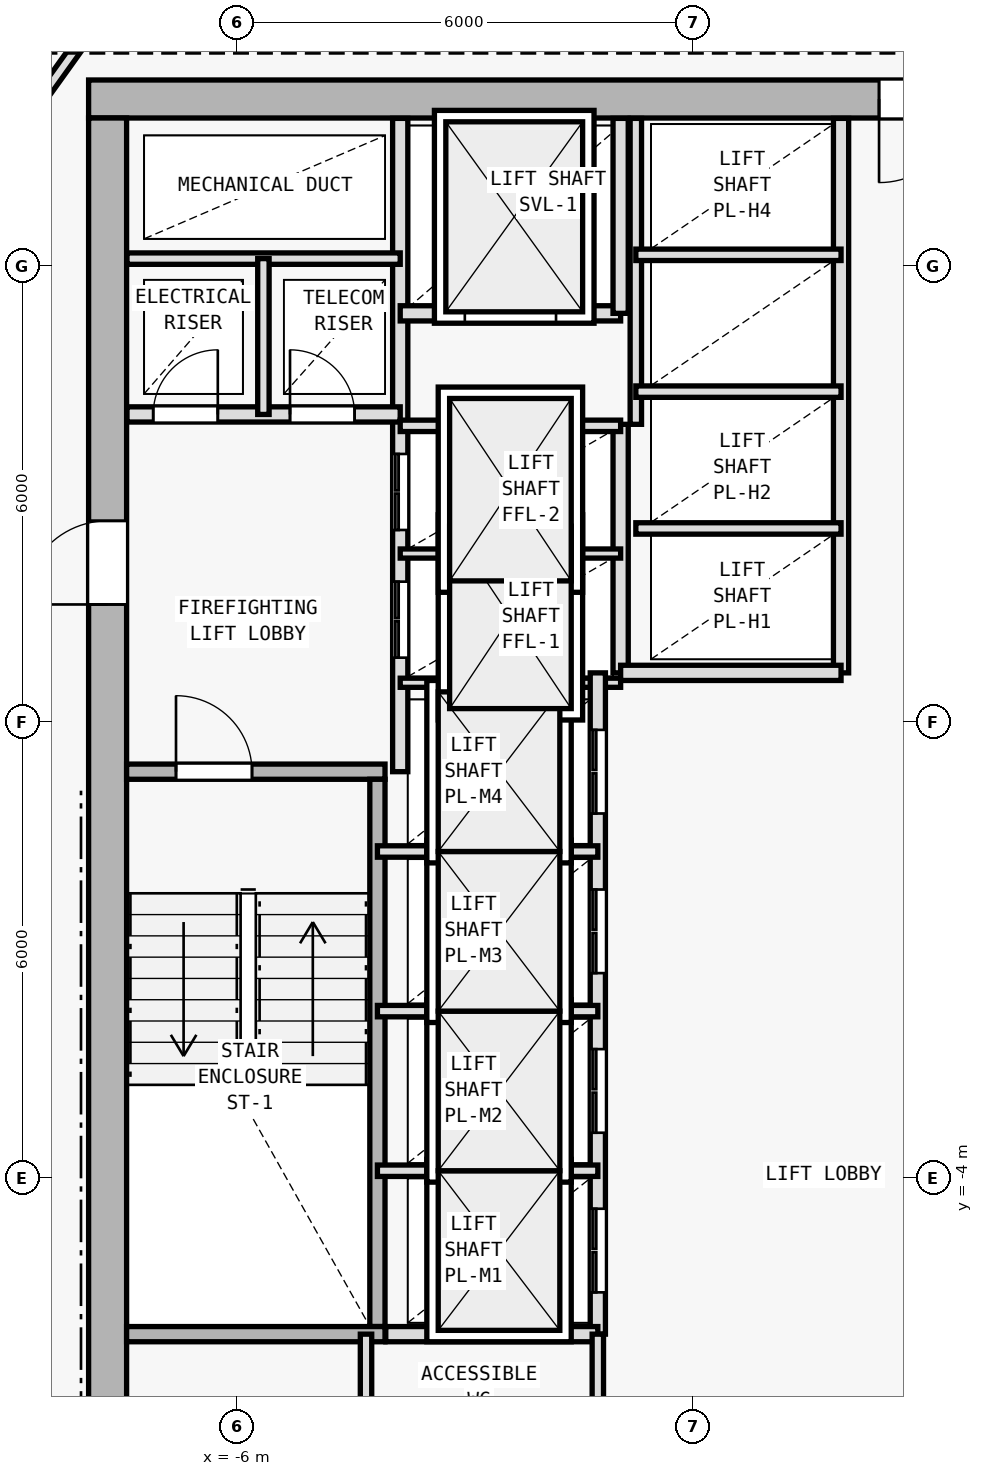
"""IFC4 building model, lengths in metres.
Left out: names, types, materials, properties, quantities, classifications, styles, units other than length and angle.
Written with IfcOpenShell. Run it as: python <this file> out.ifc"""

import sys

from ifc_helpers import new_model, si_unit, direction, frame, frame_2d, origin, origin_2d, place, context, subcontext, project, spatial, rectangle, i_section, extrude, element, fill, save


model = new_model("IFC4")
c1 = context("Model", 3, precision=1e-05, world=origin(), true_north=direction((0.0, 1.0)))
c2 = subcontext(c1, "Body", "Model", "MODEL_VIEW")
j1 = project(units=[si_unit("LENGTHUNIT", "METRE"), si_unit("PLANEANGLEUNIT", "RADIAN")], contexts=[c1])
p1 = place(None, origin())
s1 = spatial("IfcSite", under=j1, at=p1, CompositionType="ELEMENT")
p2 = place(p1, origin())
s2 = spatial("IfcBuilding", under=s1, at=p2, CompositionType="ELEMENT")
p3 = place(p2, frame((0.0, 0.0, 149.4)))
s3 = spatial("IfcBuildingStorey", under=s2, at=p3, CompositionType="ELEMENT", Elevation=149.4)
for number, where, z_axis, x_axis in (
    (1, (-7.7, 10.2, 0.0), (0.0, 0.0, 1.0), (1.0, 0.0, 0.0)),
    (2, (-7.7, 2.0, 0.0), (0.0, 0.0, 1.0), (1.0, 0.0, 0.0)),
):
    element("IfcColumn", number, at=place(p3, frame(where, z_axis=z_axis, x_axis=x_axis)), inside=s3, PredefinedType="COLUMN", context=c2, shape_type="SweptSolid", body=[
        extrude(i_section(OverallWidth=0.404, OverallDepth=0.407, WebThickness=0.017, FlangeThickness=0.028, FilletRadius=0.015, at=origin_2d()), origin(), (0.0, 0.0, 1.0), 3.6),
    ])
p4 = place(p3, frame((7.95, 10.2, 0.0), z_axis=(0.0, 0.0, 1.0), x_axis=(-1.0, 0.0, 0.0)))
e3 = element("IfcWall", 3, at=p4, inside=s3, PredefinedType="SHEAR", context=c2, shape_type="SweptSolid", body=[
    extrude(rectangle(XDim=15.9, YDim=0.5, at=frame_2d((7.95, 0.0))), origin(), (0.0, 0.0, 1.0), 3.35),
])
p5 = place(p4, frame((4.4, 0.0, 0.0)))
e4 = element("IfcOpeningElement", 4, at=p5, cuts=e3, PredefinedType="OPENING", context=c2, shape_type="SweptSolid", body=[
    extrude(rectangle(XDim=1.1, YDim=2.15, at=frame_2d((0.55, 1.075))), frame((0.0, 0.26, 0.0), z_axis=(0.0, -1.0, 0.0), x_axis=(1.0, 0.0, 0.0)), (0.0, 0.0, 1.0), 0.52),
])
p6 = place(p3, frame((-7.7, -9.15, 0.0), z_axis=(0.0, 0.0, 1.0), x_axis=(0.0, 1.0, 0.0)))
e5 = element("IfcWall", 5, at=p6, inside=s3, PredefinedType="SHEAR", context=c2, shape_type="SweptSolid", body=[
    extrude(rectangle(XDim=19.1, YDim=0.5, at=frame_2d((9.55, 0.0))), origin(), (0.0, 0.0, 1.0), 3.35),
])
p7 = place(p6, frame((12.7, 0.0, 0.0)))
e6 = element("IfcOpeningElement", 6, at=p7, cuts=e5, PredefinedType="OPENING", context=c2, shape_type="SweptSolid", body=[
    extrude(rectangle(XDim=1.1, YDim=2.15, at=frame_2d((0.55, 1.075))), frame((0.0, 0.26, 0.0), z_axis=(0.0, -1.0, 0.0), x_axis=(1.0, 0.0, 0.0)), (0.0, 0.0, 1.0), 0.52),
])
p8 = place(p3, frame((-7.45, 1.35, 0.0), z_axis=(0.0, 0.0, 1.0), x_axis=(1.0, 0.0, 0.0)))
e7 = element("IfcWall", 7, at=p8, inside=s3, PredefinedType="SOLIDWALL", context=c2, shape_type="SweptSolid", body=[
    extrude(rectangle(XDim=3.4, YDim=0.2, at=frame_2d((1.7, 0.0))), origin(), (0.0, 0.0, 1.0), 3.35),
])
p9 = place(p8, frame((0.65, 0.0, 0.0)))
e8 = element("IfcOpeningElement", 8, at=p9, cuts=e7, PredefinedType="OPENING", context=c2, shape_type="SweptSolid", body=[
    extrude(rectangle(XDim=1.0, YDim=2.15, at=frame_2d((0.5, 1.075))), frame((0.0, 0.11, 0.0), z_axis=(0.0, -1.0, 0.0), x_axis=(1.0, 0.0, 0.0)), (0.0, 0.0, 1.0), 0.22),
])
p10 = place(p3, frame((-4.15, -5.95, 0.0), z_axis=(0.0, 0.0, 1.0), x_axis=(0.0, 1.0, 0.0)))
e9 = element("IfcWall", 9, at=p10, inside=s3, PredefinedType="SOLIDWALL", context=c2, shape_type="SweptSolid", body=[
    extrude(rectangle(XDim=7.2, YDim=0.2, at=frame_2d((3.6, 0.0))), origin(), (0.0, 0.0, 1.0), 3.35),
])
p11 = place(p3, frame((-3.85, 1.35, 0.0), z_axis=(0.0, 0.0, 1.0), x_axis=(0.0, 1.0, 0.0)))
e10 = element("IfcWall", 10, at=p11, inside=s3, PredefinedType="SOLIDWALL", context=c2, shape_type="SweptSolid", body=[
    extrude(rectangle(XDim=8.595, YDim=0.2, at=frame_2d((4.297, 0.0))), origin(), (0.0, 0.0, 1.0), 3.35),
])
p12 = place(p11, frame((1.5, 0.0, 0.0)))
e11 = element("IfcOpeningElement", 11, at=p12, cuts=e10, PredefinedType="OPENING", context=c2, shape_type="SweptSolid", body=[
    extrude(rectangle(XDim=1.0, YDim=2.15, at=frame_2d((0.5, 1.075))), frame((0.0, 0.11, 0.0), z_axis=(0.0, -1.0, 0.0), x_axis=(1.0, 0.0, 0.0)), (0.0, 0.0, 1.0), 0.22),
])
p13 = place(p11, frame((3.18, 0.0, 0.0)))
e12 = element("IfcOpeningElement", 12, at=p13, cuts=e10, PredefinedType="OPENING", context=c2, shape_type="SweptSolid", body=[
    extrude(rectangle(XDim=1.0, YDim=2.15, at=frame_2d((0.5, 1.075))), frame((0.0, 0.11, 0.0), z_axis=(0.0, -1.0, 0.0), x_axis=(1.0, 0.0, 0.0)), (0.0, 0.0, 1.0), 0.22),
])
p14 = place(p3, frame((-7.445, 6.05, 0.0), z_axis=(0.0, 0.0, 1.0), x_axis=(1.0, 0.0, 0.0)))
e13 = element("IfcWall", 13, at=p14, inside=s3, PredefinedType="SOLIDWALL", context=c2, shape_type="SweptSolid", body=[
    extrude(rectangle(XDim=3.595, YDim=0.2, at=frame_2d((1.797, 0.0))), origin(), (0.0, 0.0, 1.0), 3.35),
])
p15 = place(p14, frame((0.345, 0.0, 0.0)))
e14 = element("IfcOpeningElement", 14, at=p15, cuts=e13, PredefinedType="OPENING", context=c2, shape_type="SweptSolid", body=[
    extrude(rectangle(XDim=0.85, YDim=2.1, at=frame_2d((0.425, 1.05))), frame((0.0, 0.11, 0.0), z_axis=(0.0, -1.0, 0.0), x_axis=(1.0, 0.0, 0.0)), (0.0, 0.0, 1.0), 0.22),
])
p16 = place(p14, frame((2.145, 0.0, 0.0)))
e15 = element("IfcOpeningElement", 15, at=p16, cuts=e13, PredefinedType="OPENING", context=c2, shape_type="SweptSolid", body=[
    extrude(rectangle(XDim=0.85, YDim=2.1, at=frame_2d((0.425, 1.05))), frame((0.0, 0.11, 0.0), z_axis=(0.0, -1.0, 0.0), x_axis=(1.0, 0.0, 0.0)), (0.0, 0.0, 1.0), 0.22),
])
p17 = place(p3, frame((-7.445, 8.1, 0.0), z_axis=(0.0, 0.0, 1.0), x_axis=(1.0, 0.0, 0.0)))
e16 = element("IfcWall", 16, at=p17, inside=s3, PredefinedType="PARTITIONING", context=c2, shape_type="SweptSolid", body=[
    extrude(rectangle(XDim=3.595, YDim=0.15, at=frame_2d((1.797, 0.0))), origin(), (0.0, 0.0, 1.0), 3.35),
])
p18 = place(p3, frame((-5.65, 6.05, 0.0), z_axis=(0.0, 0.0, 1.0), x_axis=(0.0, 1.0, 0.0)))
e17 = element("IfcWall", 17, at=p18, inside=s3, PredefinedType="PARTITIONING", context=c2, shape_type="SweptSolid", body=[
    extrude(rectangle(XDim=2.05, YDim=0.15, at=frame_2d((1.025, 0.0))), origin(), (0.0, 0.0, 1.0), 3.35),
])
p19 = place(p3, frame((-0.95, 2.65, 0.0), z_axis=(0.0, 0.0, 1.0), x_axis=(0.0, 1.0, 0.0)))
e18 = element("IfcWall", 18, at=p19, inside=s3, PredefinedType="SOLIDWALL", context=c2, shape_type="SweptSolid", body=[
    extrude(rectangle(XDim=3.27, YDim=0.2, at=frame_2d((1.635, 0.0))), origin(), (0.0, 0.0, 1.0), 3.35),
])
for number, where, z_axis, x_axis in (
    (19, (-3.85, 2.52, 0.0), (0.0, 0.0, 1.0), (1.0, 0.0, 0.0)),
    (20, (-3.85, 4.22, 0.0), (0.0, 0.0, 1.0), (1.0, 0.0, 0.0)),
):
    element("IfcWall", number, at=place(p3, frame(where, z_axis=z_axis, x_axis=x_axis)), inside=s3, PredefinedType="PARTITIONING", context=c2, shape_type="SweptSolid", body=[
        extrude(rectangle(XDim=2.9, YDim=0.12, at=frame_2d((1.45, 0.0))), origin(), (0.0, 0.0, 1.0), 3.35),
    ])
p20 = place(p3, frame((-3.85, 5.9, 0.0), z_axis=(0.0, 0.0, 1.0), x_axis=(1.0, 0.0, 0.0)))
e21 = element("IfcWall", 21, at=p20, inside=s3, PredefinedType="PARTITIONING", context=c2, shape_type="SweptSolid", body=[
    extrude(rectangle(XDim=2.9, YDim=0.15, at=frame_2d((1.45, 0.0))), origin(), (0.0, 0.0, 1.0), 3.35),
])
p21 = place(p3, frame((-3.85, 7.38, 0.0), z_axis=(0.0, 0.0, 1.0), x_axis=(1.0, 0.0, 0.0)))
e22 = element("IfcWall", 22, at=p21, inside=s3, PredefinedType="SOLIDWALL", context=c2, shape_type="SweptSolid", body=[
    extrude(rectangle(XDim=2.9, YDim=0.2, at=frame_2d((1.45, 0.0))), origin(), (0.0, 0.0, 1.0), 3.35),
])
p22 = place(p21, frame((0.85, 0.0, 0.0)))
e23 = element("IfcOpeningElement", 23, at=p22, cuts=e22, PredefinedType="OPENING", context=c2, shape_type="SweptSolid", body=[
    extrude(rectangle(XDim=1.2, YDim=2.2, at=frame_2d((0.6, 1.1))), frame((0.0, 0.11, 0.0), z_axis=(0.0, -1.0, 0.0), x_axis=(1.0, 0.0, 0.0)), (0.0, 0.0, 1.0), 0.22),
])
p23 = place(p3, frame((-0.95, 7.38, 0.0), z_axis=(0.0, 0.0, 1.0), x_axis=(0.0, 1.0, 0.0)))
e24 = element("IfcWall", 24, at=p23, inside=s3, PredefinedType="SOLIDWALL", context=c2, shape_type="SweptSolid", body=[
    extrude(rectangle(XDim=2.565, YDim=0.2, at=frame_2d((1.283, 0.0))), origin(), (0.0, 0.0, 1.0), 3.35),
])
p24 = place(p3, frame((-1.25, -6.05, 0.0), z_axis=(0.0, 0.0, 1.0), x_axis=(0.0, 1.0, 0.0)))
e25 = element("IfcWall", 25, at=p24, inside=s3, PredefinedType="SOLIDWALL", context=c2, shape_type="SweptSolid", body=[
    extrude(rectangle(XDim=8.7, YDim=0.2, at=frame_2d((4.35, 0.0))), origin(), (0.0, 0.0, 1.0), 3.35),
])
p25 = place(p24, frame((0.55, 0.0, 0.0)))
e26 = element("IfcOpeningElement", 26, at=p25, cuts=e25, PredefinedType="OPENING", context=c2, shape_type="SweptSolid", body=[
    extrude(rectangle(XDim=1.1, YDim=2.15, at=frame_2d((0.55, 1.075))), frame((0.0, 0.11, 0.0), z_axis=(0.0, -1.0, 0.0), x_axis=(1.0, 0.0, 0.0)), (0.0, 0.0, 1.0), 0.22),
])
p26 = place(p24, frame((2.65, 0.0, 0.0)))
e27 = element("IfcOpeningElement", 27, at=p26, cuts=e25, PredefinedType="OPENING", context=c2, shape_type="SweptSolid", body=[
    extrude(rectangle(XDim=1.1, YDim=2.15, at=frame_2d((0.55, 1.075))), frame((0.0, 0.11, 0.0), z_axis=(0.0, -1.0, 0.0), x_axis=(1.0, 0.0, 0.0)), (0.0, 0.0, 1.0), 0.22),
])
p27 = place(p24, frame((4.75, 0.0, 0.0)))
e28 = element("IfcOpeningElement", 28, at=p27, cuts=e25, PredefinedType="OPENING", context=c2, shape_type="SweptSolid", body=[
    extrude(rectangle(XDim=1.1, YDim=2.15, at=frame_2d((0.55, 1.075))), frame((0.0, 0.11, 0.0), z_axis=(0.0, -1.0, 0.0), x_axis=(1.0, 0.0, 0.0)), (0.0, 0.0, 1.0), 0.22),
])
p28 = place(p24, frame((6.85, 0.0, 0.0)))
e29 = element("IfcOpeningElement", 29, at=p28, cuts=e25, PredefinedType="OPENING", context=c2, shape_type="SweptSolid", body=[
    extrude(rectangle(XDim=1.1, YDim=2.15, at=frame_2d((0.55, 1.075))), frame((0.0, 0.11, 0.0), z_axis=(0.0, -1.0, 0.0), x_axis=(1.0, 0.0, 0.0)), (0.0, 0.0, 1.0), 0.22),
])
for number, where, z_axis, x_axis in (
    (30, (-4.15, -3.9, 0.0), (0.0, 0.0, 1.0), (1.0, 0.0, 0.0)),
    (31, (-4.15, -1.8, 0.0), (0.0, 0.0, 1.0), (1.0, 0.0, 0.0)),
    (32, (-4.15, 0.3, 0.0), (0.0, 0.0, 1.0), (1.0, 0.0, 0.0)),
):
    element("IfcWall", number, at=place(p3, frame(where, z_axis=z_axis, x_axis=x_axis)), inside=s3, PredefinedType="PARTITIONING", context=c2, shape_type="SweptSolid", body=[
        extrude(rectangle(XDim=2.9, YDim=0.15, at=frame_2d((1.45, 0.0))), origin(), (0.0, 0.0, 1.0), 3.35),
    ])
p29 = place(p3, frame((1.95, 2.65, 0.0), z_axis=(0.0, 0.0, 1.0), x_axis=(0.0, 1.0, 0.0)))
e33 = element("IfcWall", 33, at=p29, inside=s3, PredefinedType="SOLIDWALL", context=c2, shape_type="SweptSolid", body=[
    extrude(rectangle(XDim=7.295, YDim=0.2, at=frame_2d((3.647, 0.0))), origin(), (0.0, 0.0, 1.0), 3.35),
])
p30 = place(p3, frame((-0.95, 2.65, 0.0), z_axis=(0.0, 0.0, 1.0), x_axis=(1.0, 0.0, 0.0)))
e34 = element("IfcWall", 34, at=p30, inside=s3, PredefinedType="SOLIDWALL", context=c2, shape_type="SweptSolid", body=[
    extrude(rectangle(XDim=2.9, YDim=0.2, at=frame_2d((1.45, 0.0))), origin(), (0.0, 0.0, 1.0), 3.35),
])
p31 = place(p3, frame((-0.75, 5.92, 0.0), z_axis=(0.0, 0.0, 1.0), x_axis=(0.0, 1.0, 0.0)))
e35 = element("IfcWall", 35, at=p31, inside=s3, PredefinedType="PARTITIONING", context=c2, shape_type="SweptSolid", body=[
    extrude(rectangle(XDim=4.025, YDim=0.15, at=frame_2d((2.013, 0.0))), origin(), (0.0, 0.0, 1.0), 3.35),
])
for number, where, z_axis, x_axis in (
    (36, (-0.75, 4.55, 0.0), (0.0, 0.0, 1.0), (1.0, 0.0, 0.0)),
    (37, (-0.75, 6.35, 0.0), (0.0, 0.0, 1.0), (1.0, 0.0, 0.0)),
    (38, (-0.75, 8.15, 0.0), (0.0, 0.0, 1.0), (1.0, 0.0, 0.0)),
):
    element("IfcWall", number, at=place(p3, frame(where, z_axis=z_axis, x_axis=x_axis)), inside=s3, PredefinedType="PARTITIONING", context=c2, shape_type="SweptSolid", body=[
        extrude(rectangle(XDim=2.7, YDim=0.15, at=frame_2d((1.35, 0.0))), origin(), (0.0, 0.0, 1.0), 3.35),
    ])
p32 = place(p3, frame((-7.45, -6.05, 0.0), z_axis=(0.0, 0.0, 1.0), x_axis=(1.0, 0.0, 0.0)))
e39 = element("IfcWall", 39, at=p32, inside=s3, PredefinedType="SOLIDWALL", context=c2, shape_type="SweptSolid", body=[
    extrude(rectangle(XDim=3.4, YDim=0.2, at=frame_2d((1.7, 0.0))), origin(), (0.0, 0.0, 1.0), 3.35),
])
p33 = place(p3, frame((-4.04, -6.05, 0.0), z_axis=(0.0, 0.0, 1.0), x_axis=(1.0, 0.0, 0.0)))
e40 = element("IfcWall", 40, at=p33, inside=s3, PredefinedType="SOLIDWALL", context=c2, shape_type="SweptSolid", body=[
    extrude(rectangle(XDim=2.79, YDim=0.2, at=frame_2d((1.395, 0.0))), origin(), (0.0, 0.0, 1.0), 3.35),
])
p34 = place(p3, frame((-1.25, -9.145, 0.0), z_axis=(0.0, 0.0, 1.0), x_axis=(0.0, 1.0, 0.0)))
e41 = element("IfcWall", 41, at=p34, inside=s3, PredefinedType="PARTITIONING", context=c2, shape_type="SweptSolid", body=[
    extrude(rectangle(XDim=3.095, YDim=0.15, at=frame_2d((1.547, 0.0))), origin(), (0.0, 0.0, 1.0), 3.35),
])
p35 = place(p34, frame((0.845, 0.0, 0.0)))
e42 = element("IfcOpeningElement", 42, at=p35, cuts=e41, PredefinedType="OPENING", context=c2, shape_type="SweptSolid", body=[
    extrude(rectangle(XDim=0.95, YDim=2.1, at=frame_2d((0.475, 1.05))), frame((0.0, 0.085, 0.0), z_axis=(0.0, -1.0, 0.0), x_axis=(1.0, 0.0, 0.0)), (0.0, 0.0, 1.0), 0.17),
])
p36 = place(p3, frame((-4.3, -9.145, 0.0), z_axis=(0.0, 0.0, 1.0), x_axis=(0.0, 1.0, 0.0)))
e43 = element("IfcWall", 43, at=p36, inside=s3, PredefinedType="PARTITIONING", context=c2, shape_type="SweptSolid", body=[
    extrude(rectangle(XDim=3.095, YDim=0.15, at=frame_2d((1.547, 0.0))), origin(), (0.0, 0.0, 1.0), 3.35),
])
p37 = place(p36, frame((0.845, 0.0, 0.0)))
e44 = element("IfcOpeningElement", 44, at=p37, cuts=e43, PredefinedType="OPENING", context=c2, shape_type="SweptSolid", body=[
    extrude(rectangle(XDim=0.9, YDim=2.1, at=frame_2d((0.45, 1.05))), frame((0.0, 0.085, 0.0), z_axis=(0.0, -1.0, 0.0), x_axis=(1.0, 0.0, 0.0)), (0.0, 0.0, 1.0), 0.17),
])
p38 = place(p3, frame((-9.86, 8.426, 0.0), z_axis=(0.0, 0.0, 1.0), x_axis=(0.582449511476, 0.812866881218, 0.0)))
e45 = element("IfcWall", 45, at=p38, inside=s3, PredefinedType="PARTITIONING", context=c2, shape_type="SweptSolid", body=[
    extrude(rectangle(XDim=4.84, YDim=0.15, at=frame_2d((2.42, 0.0))), origin(), (0.0, 0.0, 1.0), 2.965),
])
p39 = place(p7, origin())
e46 = element("IfcDoor", 46, at=p39, inside=s3, OperationType="SINGLE_SWING_LEFT", PredefinedType="DOOR", context=c2, shape_type="SweptSolid", body=[
    extrude(rectangle(XDim=1.1, YDim=2.15, at=frame_2d((0.55, 1.075))), frame((0.0, 0.025, 0.0), z_axis=(0.0, -1.0, 0.0), x_axis=(1.0, 0.0, 0.0)), (0.0, 0.0, 1.0), 0.05),
])
fill(e6, e46)
p40 = place(p5, origin())
e47 = element("IfcDoor", 47, at=p40, inside=s3, OperationType="SINGLE_SWING_RIGHT", PredefinedType="DOOR", context=c2, shape_type="SweptSolid", body=[
    extrude(rectangle(XDim=1.1, YDim=2.15, at=frame_2d((0.55, 1.075))), frame((0.0, 0.025, 0.0), z_axis=(0.0, -1.0, 0.0), x_axis=(1.0, 0.0, 0.0)), (0.0, 0.0, 1.0), 0.05),
])
fill(e4, e47)
p41 = place(p9, origin())
e48 = element("IfcDoor", 48, at=p41, inside=s3, OperationType="SINGLE_SWING_LEFT", PredefinedType="DOOR", context=c2, shape_type="SweptSolid", body=[
    extrude(rectangle(XDim=1.0, YDim=2.15, at=frame_2d((0.5, 1.075))), frame((0.0, 0.025, 0.0), z_axis=(0.0, -1.0, 0.0), x_axis=(1.0, 0.0, 0.0)), (0.0, 0.0, 1.0), 0.05),
])
fill(e8, e48)
p42 = place(p15, origin())
e49 = element("IfcDoor", 49, at=p42, inside=s3, OperationType="SINGLE_SWING_RIGHT", PredefinedType="DOOR", context=c2, shape_type="SweptSolid", body=[
    extrude(rectangle(XDim=0.85, YDim=2.1, at=frame_2d((0.425, 1.05))), frame((0.0, 0.025, 0.0), z_axis=(0.0, -1.0, 0.0), x_axis=(1.0, 0.0, 0.0)), (0.0, 0.0, 1.0), 0.05),
])
fill(e14, e49)
p43 = place(p16, origin())
e50 = element("IfcDoor", 50, at=p43, inside=s3, OperationType="SINGLE_SWING_LEFT", PredefinedType="DOOR", context=c2, shape_type="SweptSolid", body=[
    extrude(rectangle(XDim=0.85, YDim=2.1, at=frame_2d((0.425, 1.05))), frame((0.0, 0.025, 0.0), z_axis=(0.0, -1.0, 0.0), x_axis=(1.0, 0.0, 0.0)), (0.0, 0.0, 1.0), 0.05),
])
fill(e15, e50)
p44 = place(p22, origin())
e51 = element("IfcDoor", 51, at=p44, inside=s3, OperationType="DOUBLE_DOOR_SLIDING", PredefinedType="DOOR", context=c2, shape_type="SweptSolid", body=[
    extrude(rectangle(XDim=1.2, YDim=2.2, at=frame_2d((0.6, 1.1))), frame((0.0, 0.025, 0.0), z_axis=(0.0, -1.0, 0.0), x_axis=(1.0, 0.0, 0.0)), (0.0, 0.0, 1.0), 0.05),
])
fill(e23, e51)
p45 = place(p25, origin())
e52 = element("IfcDoor", 52, at=p45, inside=s3, OperationType="DOUBLE_DOOR_SLIDING", PredefinedType="DOOR", context=c2, shape_type="SweptSolid", body=[
    extrude(rectangle(XDim=1.1, YDim=2.15, at=frame_2d((0.55, 1.075))), frame((0.0, 0.025, 0.0), z_axis=(0.0, -1.0, 0.0), x_axis=(1.0, 0.0, 0.0)), (0.0, 0.0, 1.0), 0.05),
])
fill(e26, e52)
p46 = place(p26, origin())
e53 = element("IfcDoor", 53, at=p46, inside=s3, OperationType="DOUBLE_DOOR_SLIDING", PredefinedType="DOOR", context=c2, shape_type="SweptSolid", body=[
    extrude(rectangle(XDim=1.1, YDim=2.15, at=frame_2d((0.55, 1.075))), frame((0.0, 0.025, 0.0), z_axis=(0.0, -1.0, 0.0), x_axis=(1.0, 0.0, 0.0)), (0.0, 0.0, 1.0), 0.05),
])
fill(e27, e53)
p47 = place(p27, origin())
e54 = element("IfcDoor", 54, at=p47, inside=s3, OperationType="DOUBLE_DOOR_SLIDING", PredefinedType="DOOR", context=c2, shape_type="SweptSolid", body=[
    extrude(rectangle(XDim=1.1, YDim=2.15, at=frame_2d((0.55, 1.075))), frame((0.0, 0.025, 0.0), z_axis=(0.0, -1.0, 0.0), x_axis=(1.0, 0.0, 0.0)), (0.0, 0.0, 1.0), 0.05),
])
fill(e28, e54)
p48 = place(p28, origin())
e55 = element("IfcDoor", 55, at=p48, inside=s3, OperationType="DOUBLE_DOOR_SLIDING", PredefinedType="DOOR", context=c2, shape_type="SweptSolid", body=[
    extrude(rectangle(XDim=1.1, YDim=2.15, at=frame_2d((0.55, 1.075))), frame((0.0, 0.025, 0.0), z_axis=(0.0, -1.0, 0.0), x_axis=(1.0, 0.0, 0.0)), (0.0, 0.0, 1.0), 0.05),
])
fill(e29, e55)
p49 = place(p12, origin())
e56 = element("IfcDoor", 56, at=p49, inside=s3, OperationType="DOUBLE_DOOR_SLIDING", PredefinedType="DOOR", context=c2, shape_type="SweptSolid", body=[
    extrude(rectangle(XDim=1.0, YDim=2.15, at=frame_2d((0.5, 1.075))), frame((0.0, 0.025, 0.0), z_axis=(0.0, -1.0, 0.0), x_axis=(1.0, 0.0, 0.0)), (0.0, 0.0, 1.0), 0.05),
])
fill(e11, e56)
p50 = place(p13, origin())
e57 = element("IfcDoor", 57, at=p50, inside=s3, OperationType="DOUBLE_DOOR_SLIDING", PredefinedType="DOOR", context=c2, shape_type="SweptSolid", body=[
    extrude(rectangle(XDim=1.0, YDim=2.15, at=frame_2d((0.5, 1.075))), frame((0.0, 0.025, 0.0), z_axis=(0.0, -1.0, 0.0), x_axis=(1.0, 0.0, 0.0)), (0.0, 0.0, 1.0), 0.05),
])
fill(e12, e57)
save(model, sys.argv[1])
